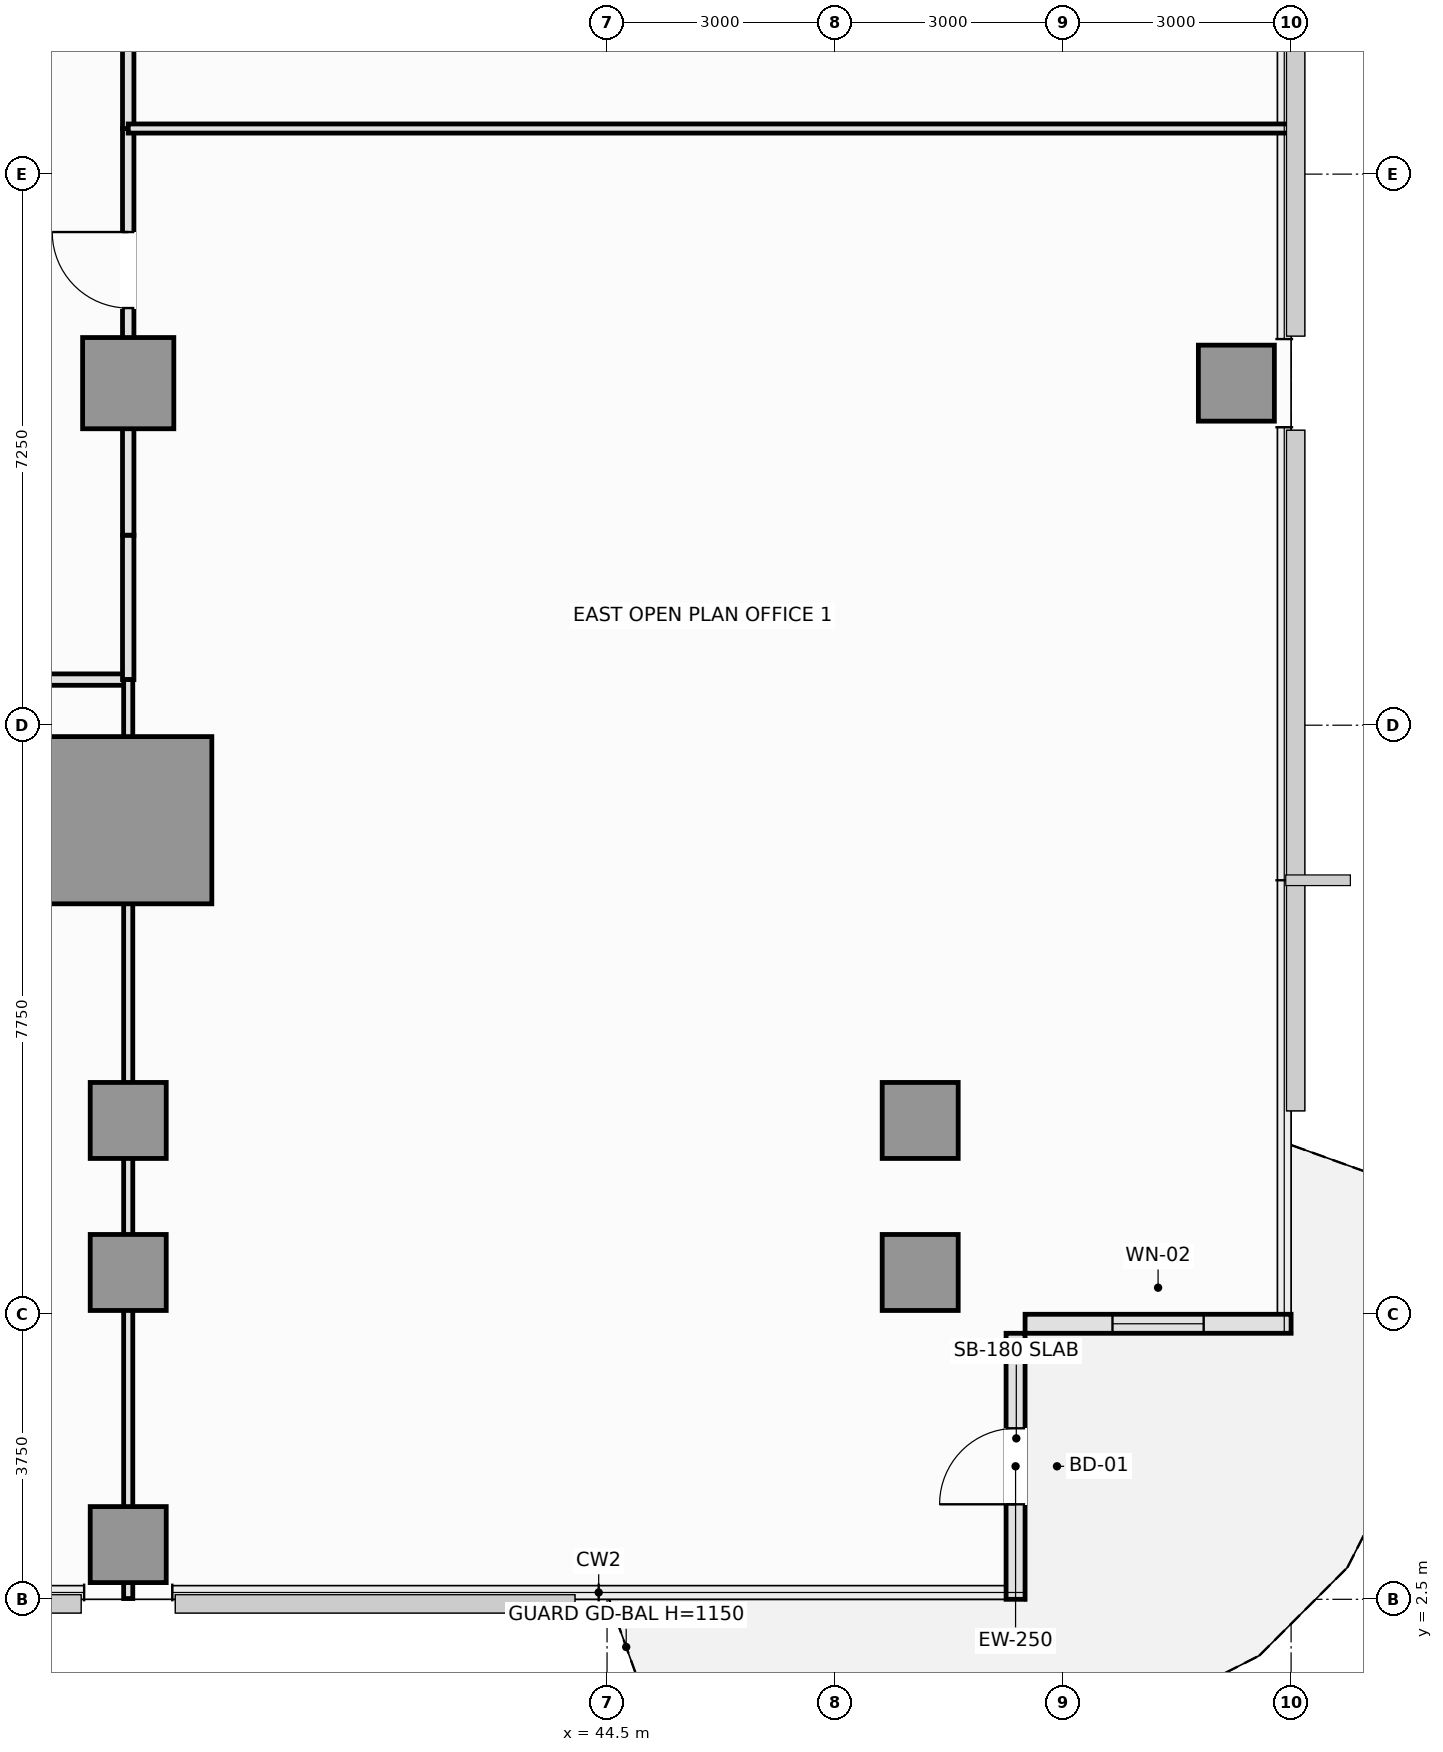
"""IFC4 building model, lengths in metres.
Left out: names, types, materials, properties, quantities, classifications, styles, units other than length and angle.
Written with IfcOpenShell. Run it as: python <this file> out.ifc"""

import sys

from ifc_helpers import new_model, si_unit, direction, frame, frame_2d, origin, origin_2d, place, context, subcontext, project, spatial, rectangle, extrude, element, fill, save


model = new_model("IFC4")
c1 = context("Model", 3, precision=1e-05, world=origin(), true_north=direction((0.0, 1.0)))
c2 = subcontext(c1, "Body", "Model", "MODEL_VIEW")
j1 = project(units=[si_unit("LENGTHUNIT", "METRE"), si_unit("PLANEANGLEUNIT", "RADIAN")], contexts=[c1])
p1 = place(None, origin())
s1 = spatial("IfcSite", under=j1, at=p1, CompositionType="ELEMENT")
p2 = place(p1, origin())
s2 = spatial("IfcBuilding", under=s1, at=p2, CompositionType="ELEMENT")
p3 = place(p2, frame((0.0, 0.0, 61.1)))
s3 = spatial("IfcBuildingStorey", under=s2, at=p3, CompositionType="ELEMENT", Elevation=61.1)
p4 = place(p3, frame((38.2, 12.75, 0.0), z_axis=(0.0, 0.0, 1.0), x_axis=(1.0, 0.0, 0.0)))
e1 = element("IfcColumn", 1, at=p4, inside=s3, PredefinedType="COLUMN", context=c2, shape_type="SweptSolid", body=[
    extrude(rectangle(XDim=2.2, YDim=2.2, at=origin_2d()), origin(), (0.0, 0.0, 1.0), 3.55),
])
p5 = place(p3, frame((38.2, 18.5, 0.0), z_axis=(0.0, 0.0, 1.0), x_axis=(1.0, 0.0, 0.0)))
e2 = element("IfcColumn", 2, at=p5, inside=s3, PredefinedType="COLUMN", context=c2, shape_type="SweptSolid", body=[
    extrude(rectangle(XDim=1.2, YDim=1.2, at=origin_2d()), origin(), (0.0, 0.0, 1.0), 3.55),
])
for number, where, z_axis, x_axis in (
    (3, (48.62, 6.8, 0.0), (0.0, 0.0, 1.0), (1.0, 0.0, 0.0)),
    (4, (38.2, 6.8, 0.0), (0.0, 0.0, 1.0), (1.0, 0.0, 0.0)),
    (5, (38.2, 8.8, 0.0), (0.0, 0.0, 1.0), (1.0, 0.0, 0.0)),
    (6, (48.62, 8.8, 0.0), (0.0, 0.0, 1.0), (1.0, 0.0, 0.0)),
    (7, (52.78, 18.5, 0.0), (0.0, 0.0, 1.0), (1.0, 0.0, 0.0)),
    (8, (38.2, 3.22, 0.0), (0.0, 0.0, 1.0), (1.0, 0.0, 0.0)),
):
    element("IfcColumn", number, at=place(p3, frame(where, z_axis=z_axis, x_axis=x_axis)), inside=s3, PredefinedType="COLUMN", context=c2, shape_type="SweptSolid", body=[
        extrude(rectangle(XDim=1.0, YDim=1.0, at=origin_2d()), origin(), (0.0, 0.0, 1.0), 3.55),
    ])
p6 = place(p3, frame((49.875, 2.5, 0.0), z_axis=(0.0, 0.0, 1.0), x_axis=(0.0, 1.0, 0.0)))
e9 = element("IfcWall", 9, at=p6, inside=s3, PredefinedType="SOLIDWALL", context=c2, shape_type="SweptSolid", body=[
    extrude(rectangle(XDim=3.5, YDim=0.25, at=frame_2d((1.75, 0.0))), origin(), (0.0, 0.0, 1.0), 3.07),
])
p7 = place(p6, frame((1.25, 0.0, 0.0)))
e10 = element("IfcOpeningElement", 10, at=p7, cuts=e9, PredefinedType="OPENING", context=c2, shape_type="SweptSolid", body=[
    extrude(rectangle(XDim=1.0, YDim=2.2, at=frame_2d((0.5, 1.1))), frame((0.0, 0.135, 0.0), z_axis=(0.0, -1.0, 0.0), x_axis=(1.0, 0.0, 0.0)), (0.0, 0.0, 1.0), 0.27),
])
p8 = place(p3, frame((50.0, 6.125, 0.0), z_axis=(0.0, 0.0, 1.0), x_axis=(1.0, 0.0, 0.0)))
e11 = element("IfcWall", 11, at=p8, inside=s3, PredefinedType="SOLIDWALL", context=c2, shape_type="SweptSolid", body=[
    extrude(rectangle(XDim=3.5, YDim=0.25, at=frame_2d((1.75, 0.0))), origin(), (0.0, 0.0, 1.0), 3.07),
])
p9 = place(p8, frame((1.15, 0.0, 0.9)))
e12 = element("IfcOpeningElement", 12, at=p9, cuts=e11, PredefinedType="OPENING", context=c2, shape_type="SweptSolid", body=[
    extrude(rectangle(XDim=1.2, YDim=1.8, at=frame_2d((0.6, 0.9))), frame((0.0, 0.135, 0.0), z_axis=(0.0, -1.0, 0.0), x_axis=(1.0, 0.0, 0.0)), (0.0, 0.0, 1.0), 0.27),
])
p10 = place(p3, frame((33.0, 14.6, 0.0), z_axis=(0.0, 0.0, 1.0), x_axis=(1.0, 0.0, 0.0)))
e13 = element("IfcWall", 13, at=p10, inside=s3, PredefinedType="PARTITIONING", context=c2, shape_type="SweptSolid", body=[
    extrude(rectangle(XDim=5.2, YDim=0.15, at=frame_2d((2.6, 0.0))), origin(), (0.0, 0.0, 1.0), 3.37),
])
p11 = place(p10, frame((2.1, 0.0, 0.0)))
e14 = element("IfcOpeningElement", 14, at=p11, cuts=e13, PredefinedType="OPENING", context=c2, shape_type="SweptSolid", body=[
    extrude(rectangle(XDim=1.0, YDim=2.15, at=frame_2d((0.5, 1.075))), frame((0.0, 0.085, 0.0), z_axis=(0.0, -1.0, 0.0), x_axis=(1.0, 0.0, 0.0)), (0.0, 0.0, 1.0), 0.17),
])
p12 = place(p3, frame((38.2, 14.6, 0.0), z_axis=(0.0, 0.0, 1.0), x_axis=(0.0, 1.0, 0.0)))
e15 = element("IfcWall", 15, at=p12, inside=s3, PredefinedType="PARTITIONING", context=c2, shape_type="SweptSolid", body=[
    extrude(rectangle(XDim=1.9, YDim=0.15, at=frame_2d((0.95, 0.0))), origin(), (0.0, 0.0, 1.0), 2.82),
])
p13 = place(p3, frame((38.2, 16.5, 0.0), z_axis=(0.0, 0.0, 1.0), x_axis=(0.0, 1.0, 0.0)))
e16 = element("IfcWall", 16, at=p13, inside=s3, PredefinedType="PARTITIONING", context=c2, shape_type="SweptSolid", body=[
    extrude(rectangle(XDim=5.35, YDim=0.15, at=frame_2d((2.675, 0.0))), origin(), (0.0, 0.0, 1.0), 2.82),
])
p14 = place(p13, frame((2.988, 0.0, 0.0)))
e17 = element("IfcOpeningElement", 17, at=p14, cuts=e16, PredefinedType="OPENING", context=c2, shape_type="SweptSolid", body=[
    extrude(rectangle(XDim=1.0, YDim=2.15, at=frame_2d((0.5, 1.075))), frame((0.0, 0.085, 0.0), z_axis=(0.0, -1.0, 0.0), x_axis=(1.0, 0.0, 0.0)), (0.0, 0.0, 1.0), 0.17),
])
p15 = place(p3, frame((38.2, 21.85, 0.0), z_axis=(0.0, 0.0, 1.0), x_axis=(0.0, 1.0, 0.0)))
e18 = element("IfcWall", 18, at=p15, inside=s3, PredefinedType="PARTITIONING", context=c2, shape_type="SweptSolid", body=[
    extrude(rectangle(XDim=3.4, YDim=0.15, at=frame_2d((1.7, 0.0))), origin(), (0.0, 0.0, 1.0), 2.82),
])
p16 = place(p15, frame((1.2, 0.0, 0.0)))
e19 = element("IfcOpeningElement", 19, at=p16, cuts=e18, PredefinedType="OPENING", context=c2, shape_type="SweptSolid", body=[
    extrude(rectangle(XDim=1.0, YDim=2.15, at=frame_2d((0.5, 1.075))), frame((0.0, 0.085, 0.0), z_axis=(0.0, -1.0, 0.0), x_axis=(1.0, 0.0, 0.0)), (0.0, 0.0, 1.0), 0.17),
])
p17 = place(p3, frame((38.2, 2.51, 0.0), z_axis=(0.0, 0.0, 1.0), x_axis=(0.0, 1.0, 0.0)))
e20 = element("IfcWall", 20, at=p17, inside=s3, PredefinedType="PARTITIONING", context=c2, shape_type="SweptSolid", body=[
    extrude(rectangle(XDim=12.09, YDim=0.12, at=frame_2d((6.045, 0.0))), origin(), (0.0, 0.0, 1.0), 2.82),
])
p18 = place(p3, frame((38.2, 21.85, 0.0), z_axis=(0.0, 0.0, 1.0), x_axis=(1.0, 0.0, 0.0)))
e21 = element("IfcWall", 21, at=p18, inside=s3, PredefinedType="PARTITIONING", context=c2, shape_type="SweptSolid", body=[
    extrude(rectangle(XDim=15.29, YDim=0.12, at=frame_2d((7.645, 0.0))), origin(), (0.0, 0.0, 1.0), 3.37),
])
p19 = place(p7, frame((1.0, 0.0, 0.0), z_axis=(0.0, 0.0, 1.0), x_axis=(-1.0, 0.0, 0.0)))
e22 = element("IfcDoor", 22, at=p19, inside=s3, OperationType="SINGLE_SWING_LEFT", PredefinedType="DOOR", context=c2, shape_type="SweptSolid", body=[
    extrude(rectangle(XDim=1.0, YDim=2.2, at=frame_2d((0.5, 1.1))), frame((0.0, 0.025, 0.0), z_axis=(0.0, -1.0, 0.0), x_axis=(1.0, 0.0, 0.0)), (0.0, 0.0, 1.0), 0.05),
])
fill(e10, e22)
p20 = place(p9, origin())
e23 = element("IfcWindow", 23, at=p20, inside=s3, PartitioningType="SINGLE_PANEL", PredefinedType="WINDOW", context=c2, shape_type="SweptSolid", body=[
    extrude(rectangle(XDim=1.2, YDim=1.8, at=frame_2d((0.6, 0.9))), frame((0.0, 0.03, 0.0), z_axis=(0.0, -1.0, 0.0), x_axis=(1.0, 0.0, 0.0)), (0.0, 0.0, 1.0), 0.06),
])
fill(e12, e23)
p21 = place(p14, origin())
e24 = element("IfcDoor", 24, at=p21, inside=s3, OperationType="SINGLE_SWING_RIGHT", PredefinedType="DOOR", context=c2, shape_type="SweptSolid", body=[
    extrude(rectangle(XDim=1.0, YDim=2.15, at=frame_2d((0.5, 1.075))), frame((0.0, 0.025, 0.0), z_axis=(0.0, -1.0, 0.0), x_axis=(1.0, 0.0, 0.0)), (0.0, 0.0, 1.0), 0.05),
])
fill(e17, e24)
save(model, sys.argv[1])
